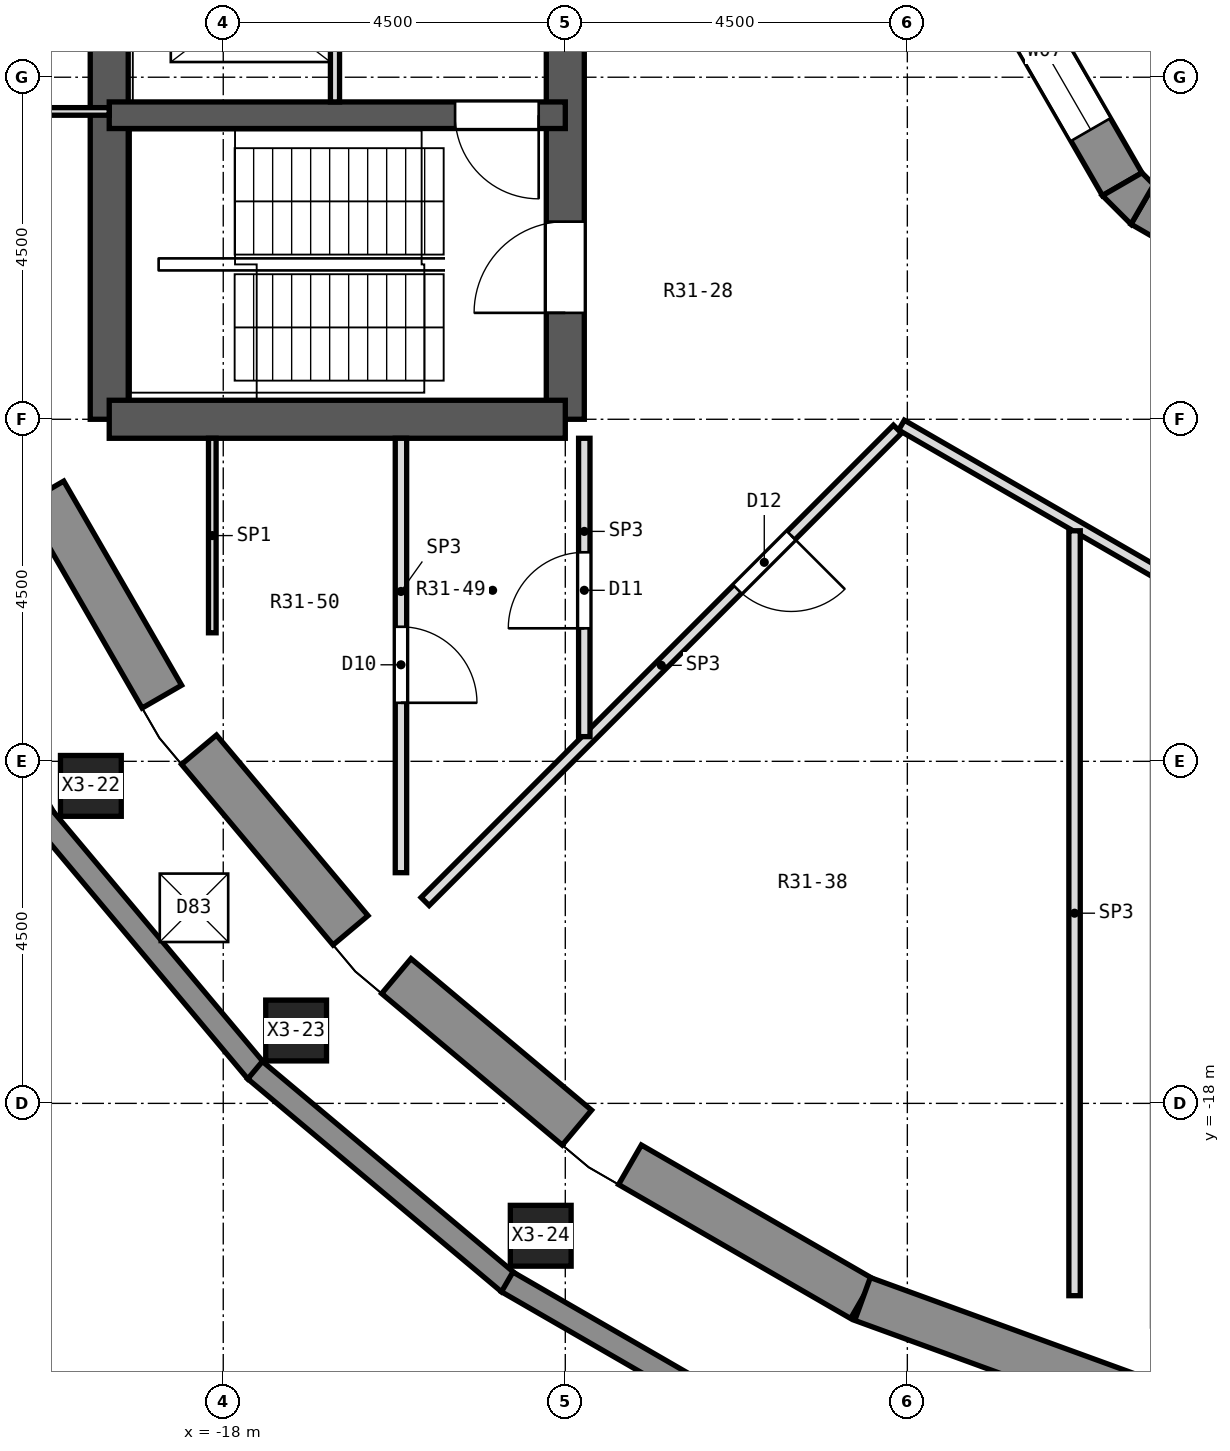
"""IFC4 building model, lengths in metres.
Left out: names, types, materials, properties, quantities, classifications, styles, units other than length and angle.
Written with IfcOpenShell. Run it as: python <this file> out.ifc"""

import sys

from ifc_helpers import new_model, si_unit, direction, frame, frame_2d, origin, origin_2d, place, context, subcontext, project, spatial, polyline, rectangle, hollow_rectangle, outline, extrude, element, fill, save


model = new_model("IFC4")
c1 = context("Model", 3, precision=1e-05, world=origin(), true_north=direction((0.0, 1.0)))
c2 = subcontext(c1, "Body", "Model", "MODEL_VIEW")
j1 = project(units=[si_unit("LENGTHUNIT", "METRE"), si_unit("PLANEANGLEUNIT", "RADIAN")], contexts=[c1])
p1 = place(None, origin())
s1 = spatial("IfcSite", under=j1, at=p1, CompositionType="ELEMENT")
p2 = place(p1, origin())
s2 = spatial("IfcBuilding", under=s1, at=p2, CompositionType="ELEMENT")
p3 = place(p2, frame((0.0, 0.0, 220.2)))
s3 = spatial("IfcBuildingStorey", under=s2, at=p3, CompositionType="ELEMENT", Elevation=220.2)
p4 = place(p3, frame((-21.842, -10.185, 0.196), z_axis=(0.444111400041, 0.207072547736, 0.871714416726), x_axis=(-0.422584737529, 0.906323418878, 0.0)))
e1 = element("IfcColumn", 1, at=p4, inside=s3, PredefinedType="COLUMN", context=c2, shape_type="SweptSolid", body=[
    extrude(hollow_rectangle(XDim=0.8, YDim=0.8, WallThickness=0.05, at=origin_2d()), origin(), (0.0, 0.0, 1.0), 4.082),
])
p5 = place(p3, frame((-19.741, -13.823, 0.196), z_axis=(0.401353278691, 0.281066923483, 0.871732143613), x_axis=(-0.573626190743, 0.819117203636, 0.0)))
e2 = element("IfcColumn", 2, at=p5, inside=s3, PredefinedType="COLUMN", context=c2, shape_type="SweptSolid", body=[
    extrude(hollow_rectangle(XDim=0.8, YDim=0.8, WallThickness=0.05, at=origin_2d()), origin(), (0.0, 0.0, 1.0), 4.082),
])
p6 = place(p3, frame((-17.041, -17.041, 0.196), z_axis=(0.346495601837, 0.346495601837, 0.871711876605), x_axis=(-0.707106781187, 0.707106781187, 0.0)))
e3 = element("IfcColumn", 3, at=p6, inside=s3, PredefinedType="COLUMN", context=c2, shape_type="SweptSolid", body=[
    extrude(hollow_rectangle(XDim=0.8, YDim=0.8, WallThickness=0.05, at=origin_2d()), origin(), (0.0, 0.0, 1.0), 4.082),
])
p7 = place(p3, frame((-13.823, -19.741, 0.196), z_axis=(0.281066923483, 0.401353278691, 0.871732143613), x_axis=(-0.819117203636, 0.573626190743, 0.0)))
e4 = element("IfcColumn", 4, at=p7, inside=s3, PredefinedType="COLUMN", context=c2, shape_type="SweptSolid", body=[
    extrude(hollow_rectangle(XDim=0.8, YDim=0.8, WallThickness=0.05, at=origin_2d()), origin(), (0.0, 0.0, 1.0), 4.082),
])
p8 = place(p3, frame((-13.5, -9.0, 0.0), z_axis=(0.0, 0.0, 1.0), x_axis=(0.0, 1.0, 0.0)))
e5 = element("IfcWall", 5, at=p8, inside=s3, PredefinedType="SHEAR", context=c2, shape_type="SweptSolid", body=[
    extrude(rectangle(XDim=18.0, YDim=0.5, at=frame_2d((9.0, 0.0))), origin(), (0.0, 0.0, 1.0), 4.5),
])
p9 = place(p8, frame((15.4, 0.0, 0.0)))
e6 = element("IfcOpeningElement", 6, at=p9, cuts=e5, PredefinedType="OPENING", context=c2, shape_type="SweptSolid", body=[
    extrude(rectangle(XDim=1.2, YDim=2.1, at=frame_2d((0.6, 1.05))), frame((0.0, 0.262, 0.0), z_axis=(0.0, -1.0, 0.0), x_axis=(1.0, 0.0, 0.0)), (0.0, 0.0, 1.0), 0.524),
])
p10 = place(p8, frame((1.4, 0.0, 0.0)))
e7 = element("IfcOpeningElement", 7, at=p10, cuts=e5, PredefinedType="OPENING", context=c2, shape_type="SweptSolid", body=[
    extrude(rectangle(XDim=1.2, YDim=2.1, at=frame_2d((0.6, 1.05))), frame((0.0, 0.262, 0.0), z_axis=(0.0, -1.0, 0.0), x_axis=(1.0, 0.0, 0.0)), (0.0, 0.0, 1.0), 0.524),
])
p11 = place(p8, frame((7.5, 0.0, 0.0)))
e8 = element("IfcOpeningElement", 8, at=p11, cuts=e5, PredefinedType="OPENING", context=c2, shape_type="SweptSolid", body=[
    extrude(rectangle(XDim=3.0, YDim=2.4, at=frame_2d((1.5, 1.2))), frame((0.0, 0.262, 0.0), z_axis=(0.0, -1.0, 0.0), x_axis=(1.0, 0.0, 0.0)), (0.0, 0.0, 1.0), 0.524),
])
p12 = place(p3, frame((-19.5, -9.0, 0.0), z_axis=(0.0, 0.0, 1.0), x_axis=(0.0, 1.0, 0.0)))
e9 = element("IfcWall", 9, at=p12, inside=s3, PredefinedType="SHEAR", context=c2, shape_type="SweptSolid", body=[
    extrude(rectangle(XDim=18.0, YDim=0.5, at=frame_2d((9.0, 0.0))), origin(), (0.0, 0.0, 1.0), 4.5),
])
p13 = place(p12, frame((9.45, 0.0, 0.0)))
e10 = element("IfcOpeningElement", 10, at=p13, cuts=e9, PredefinedType="OPENING", context=c2, shape_type="SweptSolid", body=[
    extrude(rectangle(XDim=0.9, YDim=2.1, at=frame_2d((0.45, 1.05))), frame((0.0, 0.262, 0.0), z_axis=(0.0, -1.0, 0.0), x_axis=(1.0, 0.0, 0.0)), (0.0, 0.0, 1.0), 0.524),
])
p14 = place(p12, frame((7.65, 0.0, 0.0)))
e11 = element("IfcOpeningElement", 11, at=p14, cuts=e9, PredefinedType="OPENING", context=c2, shape_type="SweptSolid", body=[
    extrude(rectangle(XDim=0.9, YDim=2.1, at=frame_2d((0.45, 1.05))), frame((0.0, 0.262, 0.0), z_axis=(0.0, -1.0, 0.0), x_axis=(1.0, 0.0, 0.0)), (0.0, 0.0, 1.0), 0.524),
])
p15 = place(p3, frame((-13.5, -9.0, 0.0), z_axis=(0.0, 0.0, 1.0), x_axis=(-1.0, 0.0, 0.0)))
e12 = element("IfcWall", 12, at=p15, inside=s3, PredefinedType="SHEAR", context=c2, shape_type="SweptSolid", body=[
    extrude(rectangle(XDim=6.0, YDim=0.5, at=frame_2d((3.0, 0.0))), origin(), (0.0, 0.0, 1.0), 4.5),
])
p16 = place(p3, frame((-13.5, -5.0, 0.0), z_axis=(0.0, 0.0, 1.0), x_axis=(-1.0, 0.0, 0.0)))
e13 = element("IfcWall", 13, at=p16, inside=s3, PredefinedType="SHEAR", context=c2, shape_type="SweptSolid", body=[
    extrude(rectangle(XDim=6.0, YDim=0.35, at=frame_2d((3.0, 0.0))), origin(), (0.0, 0.0, 1.0), 4.5),
])
p17 = place(p16, frame((0.35, 0.0, 0.0)))
e14 = element("IfcOpeningElement", 14, at=p17, cuts=e13, PredefinedType="OPENING", context=c2, shape_type="SweptSolid", body=[
    extrude(rectangle(XDim=1.1, YDim=2.1, at=frame_2d((0.55, 1.05))), frame((0.0, 0.187, 0.0), z_axis=(0.0, -1.0, 0.0), x_axis=(1.0, 0.0, 0.0)), (0.0, 0.0, 1.0), 0.374),
])
for number, where, z_axis, x_axis in (
    (15, (-20.358, -9.963, 0.0), (0.0, 0.0, 1.0), (0.5, -0.866, 0.0)),
    (16, (-18.319, -13.347, 0.0), (0.0, 0.0, 1.0), (0.643, -0.766, 0.0)),
    (17, (-15.723, -16.325, 0.0), (0.0, 0.0, 1.0), (0.766, -0.643, 0.0)),
):
    element("IfcWall", number, at=place(p3, frame(where, z_axis=z_axis, x_axis=x_axis)), inside=s3, PredefinedType="SOLIDWALL", context=c2, shape_type="SweptSolid", body=[
        extrude(rectangle(XDim=3.101, YDim=0.6, at=frame_2d((1.551, 0.0))), origin(), (0.0, 0.0, 1.0), 3.95),
    ])
p18 = place(p3, frame((-12.649, -18.808, 0.0), z_axis=(0.0, 0.0, 1.0), x_axis=(0.86601836006, -0.500012199891, 0.0)))
e18 = element("IfcWall", 18, at=p18, inside=s3, PredefinedType="SOLIDWALL", context=c2, shape_type="SweptSolid", body=[
    extrude(rectangle(XDim=3.525, YDim=0.6, at=frame_2d((1.763, 0.0))), origin(), (0.0, 0.0, 1.0), 3.95),
])
p19 = place(p3, frame((-9.589, -20.573, 0.0), z_axis=(0.0, 0.0, 1.0), x_axis=(0.939699526391, -0.342001169736, 0.0)))
e19 = element("IfcWall", 19, at=p19, inside=s3, PredefinedType="SOLIDWALL", context=c2, shape_type="SweptSolid", body=[
    extrude(rectangle(XDim=3.949, YDim=0.6, at=frame_2d((1.975, 0.0))), origin(), (0.0, 0.0, 1.0), 3.95),
])
p20 = place(p3, frame((-8.203, -2.393, 0.0), z_axis=(0.0, 0.0, 1.0), x_axis=(0.499994954979, -0.866028316509, 0.0)))
e20 = element("IfcWall", 20, at=p20, inside=s3, PredefinedType="SOLIDWALL", context=c2, shape_type="SweptSolid", body=[
    extrude(rectangle(XDim=4.059, YDim=0.6, at=frame_2d((2.029, 0.0))), origin(), (0.0, 0.0, 1.0), 3.95),
])
p21 = place(p20, frame((0.829, 0.0, 1.5)))
e21 = element("IfcOpeningElement", 21, at=p21, cuts=e20, PredefinedType="OPENING", context=c2, shape_type="SweptSolid", body=[
    extrude(rectangle(XDim=2.4, YDim=2.0, at=frame_2d((1.2, 1.0))), frame((0.0, 0.312, 0.0), z_axis=(0.0, -1.0, 0.0), x_axis=(1.0, 0.0, 0.0)), (0.0, 0.0, 1.0), 0.624),
])
p22 = place(p3, frame((-5.907, -6.173, 0.0), z_axis=(0.0, 0.0, 1.0), x_axis=(0.866028316509, -0.499994954979, 0.0)))
e22 = element("IfcWall", 22, at=p22, inside=s3, PredefinedType="SOLIDWALL", context=c2, shape_type="SweptSolid", body=[
    extrude(rectangle(XDim=4.059, YDim=0.6, at=frame_2d((2.029, 0.0))), origin(), (0.0, 0.0, 1.0), 3.95),
])
p23 = place(p22, frame((0.829, 0.0, 1.5)))
e23 = element("IfcOpeningElement", 23, at=p23, cuts=e22, PredefinedType="OPENING", context=c2, shape_type="SweptSolid", body=[
    extrude(rectangle(XDim=2.4, YDim=2.0, at=frame_2d((1.2, 1.0))), frame((0.0, 0.312, 0.0), z_axis=(0.0, -1.0, 0.0), x_axis=(1.0, 0.0, 0.0)), (0.0, 0.0, 1.0), 0.624),
])
p24 = place(p3, origin())
e24 = element("IfcWall", 24, at=p24, inside=s3, PredefinedType="SOLIDWALL", context=c2, shape_type="SweptSolid", body=[
    extrude(outline(polyline([(-6.058, -6.433), (-5.758, -5.914), (-5.914, -5.758), (-6.433, -6.058), (-6.058, -6.433)])), origin(), (0.0, 0.0, 1.0), 3.95),
])
for number, where, z_axis, x_axis in (
    (25, (-22.528, -10.49, 0.0), (0.0, 0.0, 1.0), (0.5, -0.866, 0.0)),
    (26, (-20.364, -14.243, 0.0), (0.0, 0.0, 1.0), (0.643, -0.766, 0.0)),
    (27, (-17.581, -17.563, 0.0), (0.0, 0.0, 1.0), (0.766, -0.643, 0.0)),
    (28, (-14.264, -20.349, 0.0), (0.0, 0.0, 1.0), (0.866, -0.5, 0.0)),
):
    element("IfcWall", number, at=place(p3, frame(where, z_axis=z_axis, x_axis=x_axis)), inside=s3, PredefinedType="PARAPET", context=c2, shape_type="SweptSolid", body=[
        extrude(rectangle(XDim=4.358, YDim=0.3, at=frame_2d((2.179, 0.0))), origin(), (0.0, 0.0, 1.0), 1.1),
    ])
p25 = place(p3, frame((-9.077, -9.077, 0.0), z_axis=(0.0, 0.0, 1.0), x_axis=(0.865961614908, -0.500110469302, 0.0)))
e29 = element("IfcWall", 29, at=p25, inside=s3, PredefinedType="PARTITIONING", context=c2, shape_type="SweptSolid", body=[
    extrude(rectangle(XDim=6.645, YDim=0.15, at=frame_2d((3.322, 0.0))), origin(), (0.0, 0.0, 1.0), 3.95),
])
p26 = place(p25, frame((4.772, 0.0, 0.0)))
e30 = element("IfcOpeningElement", 30, at=p26, cuts=e29, PredefinedType="OPENING", context=c2, shape_type="SweptSolid", body=[
    extrude(rectangle(XDim=1.0, YDim=2.1, at=frame_2d((0.5, 1.05))), frame((0.0, 0.087, 0.0), z_axis=(0.0, -1.0, 0.0), x_axis=(1.0, 0.0, 0.0)), (0.0, 0.0, 1.0), 0.174),
])
p27 = place(p3, frame((-15.344, -15.344, 0.0), z_axis=(0.0, 0.0, 1.0), x_axis=(0.707106781187, 0.707106781187, 0.0)))
e31 = element("IfcWall", 31, at=p27, inside=s3, PredefinedType="PARTITIONING", context=c2, shape_type="SweptSolid", body=[
    extrude(rectangle(XDim=8.788, YDim=0.15, at=frame_2d((4.394, 0.0))), origin(), (0.0, 0.0, 1.0), 3.95),
])
p28 = place(p27, frame((5.81, 0.0, 0.0)))
e32 = element("IfcOpeningElement", 32, at=p28, cuts=e31, PredefinedType="OPENING", context=c2, shape_type="SweptSolid", body=[
    extrude(rectangle(XDim=1.0, YDim=2.1, at=frame_2d((0.5, 1.05))), frame((0.0, 0.087, 0.0), z_axis=(0.0, -1.0, 0.0), x_axis=(1.0, 0.0, 0.0)), (0.0, 0.0, 1.0), 0.174),
])
p29 = place(p3, frame((-6.8, -20.53, 0.0), z_axis=(0.0, 0.0, 1.0), x_axis=(0.0, 1.0, 0.0)))
e33 = element("IfcWall", 33, at=p29, inside=s3, PredefinedType="PARTITIONING", context=c2, shape_type="SweptSolid", body=[
    extrude(rectangle(XDim=10.063, YDim=0.15, at=frame_2d((5.031, 0.0))), origin(), (0.0, 0.0, 1.0), 3.95),
])
p30 = place(p3, frame((-13.25, -13.175, 0.0), z_axis=(0.0, 0.0, 1.0), x_axis=(0.0, 1.0, 0.0)))
e34 = element("IfcWall", 34, at=p30, inside=s3, PredefinedType="PARTITIONING", context=c2, shape_type="SweptSolid", body=[
    extrude(rectangle(XDim=3.925, YDim=0.15, at=frame_2d((1.962, 0.0))), origin(), (0.0, 0.0, 1.0), 3.95),
])
p31 = place(p30, frame((1.425, 0.0, 0.0)))
e35 = element("IfcOpeningElement", 35, at=p31, cuts=e34, PredefinedType="OPENING", context=c2, shape_type="SweptSolid", body=[
    extrude(rectangle(XDim=1.0, YDim=2.1, at=frame_2d((0.5, 1.05))), frame((0.0, 0.087, 0.0), z_axis=(0.0, -1.0, 0.0), x_axis=(1.0, 0.0, 0.0)), (0.0, 0.0, 1.0), 0.174),
])
p32 = place(p3, frame((-15.662, -14.965, 0.0), z_axis=(0.0, 0.0, 1.0), x_axis=(0.0, 1.0, 0.0)))
e36 = element("IfcWall", 36, at=p32, inside=s3, PredefinedType="PARTITIONING", context=c2, shape_type="SweptSolid", body=[
    extrude(rectangle(XDim=5.715, YDim=0.15, at=frame_2d((2.857, 0.0))), origin(), (0.0, 0.0, 1.0), 3.95),
])
p33 = place(p32, frame((2.235, 0.0, 0.0)))
e37 = element("IfcOpeningElement", 37, at=p33, cuts=e36, PredefinedType="OPENING", context=c2, shape_type="SweptSolid", body=[
    extrude(rectangle(XDim=1.0, YDim=2.1, at=frame_2d((0.5, 1.05))), frame((0.0, 0.087, 0.0), z_axis=(0.0, -1.0, 0.0), x_axis=(1.0, 0.0, 0.0)), (0.0, 0.0, 1.0), 0.174),
])
p34 = place(p3, frame((-18.144, -11.809, 0.0), z_axis=(0.0, 0.0, 1.0), x_axis=(0.0, 1.0, 0.0)))
e38 = element("IfcWall", 38, at=p34, inside=s3, PredefinedType="PARTITIONING", context=c2, shape_type="SweptSolid", body=[
    extrude(rectangle(XDim=2.559, YDim=0.1, at=frame_2d((1.28, 0.0))), origin(), (0.0, 0.0, 1.0), 3.95),
])
p35 = place(p3, frame((-19.5, -4.95, 0.0), z_axis=(0.0, 0.0, 1.0), x_axis=(-1.0, 0.0, 0.0)))
e39 = element("IfcWall", 39, at=p35, inside=s3, PredefinedType="PARTITIONING", context=c2, shape_type="SweptSolid", body=[
    extrude(rectangle(XDim=2.284, YDim=0.1, at=frame_2d((1.142, 0.0))), origin(), (0.0, 0.0, 1.0), 3.95),
])
p36 = place(p3, frame((-16.53, -4.825, 0.0), z_axis=(0.0, 0.0, 1.0), x_axis=(0.0, 1.0, 0.0)))
e40 = element("IfcWall", 40, at=p36, inside=s3, PredefinedType="PARTITIONING", context=c2, shape_type="SweptSolid", body=[
    extrude(rectangle(XDim=2.65, YDim=0.12, at=frame_2d((1.325, 0.0))), origin(), (0.0, 0.0, 1.0), 3.95),
])
p37 = place(p36, frame((0.775, 0.0, 0.0)))
e41 = element("IfcOpeningElement", 41, at=p37, cuts=e40, PredefinedType="OPENING", context=c2, shape_type="SweptSolid", body=[
    extrude(rectangle(XDim=1.1, YDim=2.1, at=frame_2d((0.55, 1.05))), frame((0.0, 0.072, 0.0), z_axis=(0.0, -1.0, 0.0), x_axis=(1.0, 0.0, 0.0)), (0.0, 0.0, 1.0), 0.144),
])
p38 = place(p21, origin())
e42 = element("IfcWindow", 42, at=p38, inside=s3, PartitioningType="SINGLE_PANEL", PredefinedType="WINDOW", context=c2, shape_type="SweptSolid", body=[
    extrude(rectangle(XDim=2.4, YDim=2.0, at=frame_2d((1.2, 1.0))), frame((0.0, -0.12, 0.0), z_axis=(0.0, -1.0, 0.0), x_axis=(1.0, 0.0, 0.0)), (0.0, 0.0, 1.0), 0.06),
])
fill(e21, e42)
p39 = place(p3, frame((0.0, 0.0, -0.6)))
p40 = place(p39, frame((-18.385, -15.427, 0.0)))
p41 = place(p40, frame((0.0, 0.0, 0.55)))
e43 = element("IfcDoor", 43, at=p41, inside=s3, OperationType="SINGLE_SWING_LEFT", PredefinedType="TRAPDOOR", context=c2, shape_type="SweptSolid", body=[
    extrude(rectangle(XDim=0.9, YDim=0.9, at=origin_2d()), origin(), (0.0, 0.0, 1.0), 0.05),
])
p42 = place(p33, frame((1.0, 0.0, 0.0), z_axis=(0.0, 0.0, 1.0), x_axis=(-1.0, 0.0, 0.0)))
e44 = element("IfcDoor", 44, at=p42, inside=s3, OperationType="SINGLE_SWING_RIGHT", PredefinedType="DOOR", context=c2, shape_type="SweptSolid", body=[
    extrude(rectangle(XDim=1.0, YDim=2.1, at=frame_2d((0.5, 1.05))), frame((0.0, 0.025, 0.0), z_axis=(0.0, -1.0, 0.0), x_axis=(1.0, 0.0, 0.0)), (0.0, 0.0, 1.0), 0.05),
])
fill(e37, e44)
p43 = place(p31, origin())
e45 = element("IfcDoor", 45, at=p43, inside=s3, OperationType="SINGLE_SWING_LEFT", PredefinedType="DOOR", context=c2, shape_type="SweptSolid", body=[
    extrude(rectangle(XDim=1.0, YDim=2.1, at=frame_2d((0.5, 1.05))), frame((0.0, 0.025, 0.0), z_axis=(0.0, -1.0, 0.0), x_axis=(1.0, 0.0, 0.0)), (0.0, 0.0, 1.0), 0.05),
])
fill(e35, e45)
p44 = place(p28, frame((1.0, 0.0, 0.0), z_axis=(0.0, 0.0, 1.0), x_axis=(-1.0, 0.0, 0.0)))
e46 = element("IfcDoor", 46, at=p44, inside=s3, OperationType="SINGLE_SWING_LEFT", PredefinedType="DOOR", context=c2, shape_type="SweptSolid", body=[
    extrude(rectangle(XDim=1.0, YDim=2.1, at=frame_2d((0.5, 1.05))), frame((0.0, 0.025, 0.0), z_axis=(0.0, -1.0, 0.0), x_axis=(1.0, 0.0, 0.0)), (0.0, 0.0, 1.0), 0.05),
])
fill(e32, e46)
p45 = place(p17, origin())
e47 = element("IfcDoor", 47, at=p45, inside=s3, OperationType="SINGLE_SWING_LEFT", PredefinedType="DOOR", context=c2, shape_type="SweptSolid", body=[
    extrude(rectangle(XDim=1.1, YDim=2.1, at=frame_2d((0.55, 1.05))), frame((0.0, 0.025, 0.0), z_axis=(0.0, -1.0, 0.0), x_axis=(1.0, 0.0, 0.0)), (0.0, 0.0, 1.0), 0.05),
])
fill(e14, e47)
p46 = place(p10, origin())
e48 = element("IfcDoor", 48, at=p46, inside=s3, OperationType="SINGLE_SWING_LEFT", PredefinedType="DOOR", context=c2, shape_type="SweptSolid", body=[
    extrude(rectangle(XDim=1.2, YDim=2.1, at=frame_2d((0.6, 1.05))), frame((0.0, 0.025, 0.0), z_axis=(0.0, -1.0, 0.0), x_axis=(1.0, 0.0, 0.0)), (0.0, 0.0, 1.0), 0.05),
])
fill(e7, e48)
save(model, sys.argv[1])
